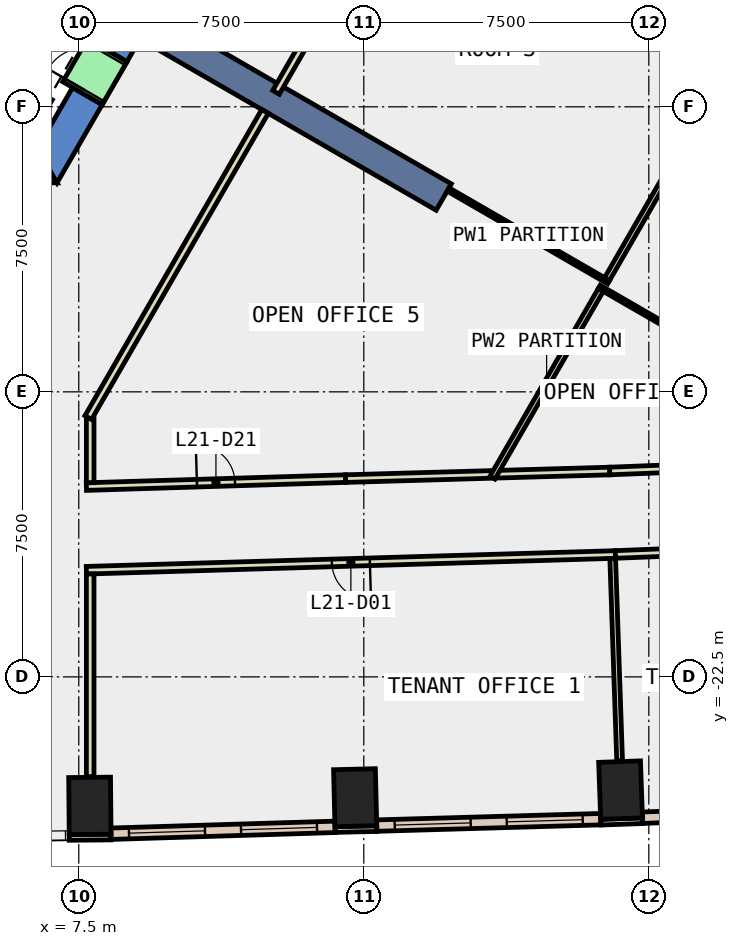
"""IFC4 building model, lengths in metres.
Left out: names, types, materials, properties, quantities, classifications, styles, units other than length and angle.
Written with IfcOpenShell. Run it as: python <this file> out.ifc"""

import sys

from ifc_helpers import new_model, si_unit, direction, frame, frame_2d, origin, origin_2d, place, context, subcontext, project, spatial, polyline, rectangle, outline, extrude, element, fill, save


model = new_model("IFC4")
c1 = context("Model", 3, precision=1e-05, world=origin(), true_north=direction((0.0, 1.0)))
c2 = subcontext(c1, "Body", "Model", "MODEL_VIEW")
j1 = project(units=[si_unit("LENGTHUNIT", "METRE"), si_unit("PLANEANGLEUNIT", "RADIAN")], contexts=[c1])
p1 = place(None, origin())
s1 = spatial("IfcSite", under=j1, at=p1, CompositionType="ELEMENT")
p2 = place(p1, origin())
s2 = spatial("IfcBuilding", under=s1, at=p2, CompositionType="ELEMENT")
p3 = place(p2, frame((0.0, 0.0, 99.2)))
s3 = spatial("IfcBuildingStorey", under=s2, at=p3, CompositionType="ELEMENT", Elevation=99.2)
for number, where, z_axis, x_axis in (
    (1, (7.792, -25.894, -0.4), (0.0, 0.0, 1.0), (1.0, 0.009, 0.0)),
    (2, (14.773, -25.679, -0.4), (0.0, 0.0, 1.0), (1.0, 0.024, 0.0)),
    (3, (21.757, -25.479, -0.4), (0.0, 0.0, 1.0), (0.999, 0.035, 0.0)),
):
    element("IfcColumn", number, at=place(p3, frame(where, z_axis=z_axis, x_axis=x_axis)), inside=s3, PredefinedType="COLUMN", context=c2, shape_type="SweptSolid", body=[
        extrude(rectangle(XDim=1.1, YDim=1.5, at=origin_2d()), origin(), (0.0, 0.0, 1.0), 4.2),
    ])
p4 = place(p3, frame((0.0, 0.0, -0.4)))
e4 = element("IfcWall", 4, at=p4, inside=s3, PredefinedType="SHEAR", context=c2, shape_type="SweptSolid", body=[
    extrude(outline(polyline([(5.75, -8.6), (5.75, -9.5), (6.928, -9.5), (6.409, -8.6), (5.75, -8.6)])), origin(), (0.0, 0.0, 1.0), 4.2),
])
p5 = place(p3, frame((0.0, 0.0, -0.4)))
e5 = element("IfcWall", 5, at=p5, inside=s3, PredefinedType="SHEAR", context=c2, shape_type="SweptSolid", body=[
    extrude(outline(polyline([(8.117, -7.44), (7.338, -6.99), (6.409, -8.6), (6.928, -9.5), (8.117, -7.44)])), origin(), (0.0, 0.0, 1.0), 4.2),
])
p6 = place(p3, frame((0.0, 0.0, -0.4)))
e6 = element("IfcWall", 6, at=p6, inside=s3, PredefinedType="SHEAR", context=c2, shape_type="SweptSolid", body=[
    extrude(outline(polyline([(9.417, -5.189), (8.638, -4.739), (7.988, -5.864), (8.767, -6.314), (9.417, -5.189)])), origin(), (0.0, 0.0, 1.0), 4.2),
])
p7 = place(p3, frame((0.0, 0.0, 3.6)))
e7 = element("IfcWall", 7, at=p7, inside=s3, PredefinedType="SHEAR", context=c2, shape_type="SweptSolid", body=[
    extrude(outline(polyline([(8.767, -6.314), (7.988, -5.864), (7.338, -6.99), (8.117, -7.44), (8.767, -6.314)])), origin(), (0.0, 0.0, 1.0), 0.2),
])
p8 = place(p3, frame((9.31, -5.375, -0.4), z_axis=(0.0, 0.0, 1.0), x_axis=(0.866017533419, -0.500013631625, 0.0)))
e8 = element("IfcWall", 8, at=p8, inside=s3, PredefinedType="SHEAR", context=c2, shape_type="SweptSolid", body=[
    extrude(rectangle(XDim=9.0, YDim=0.8, at=frame_2d((4.5, 0.0))), origin(), (0.0, 0.0, 1.0), 4.2),
])
p9 = place(p3, frame((7.249, -26.724, 0.0), z_axis=(0.0, 0.0, 1.0), x_axis=(0.99995860686, 0.009098602504, 0.0)))
e9 = element("IfcWall", 9, at=p9, inside=s3, PredefinedType="STANDARD", context=c2, shape_type="SweptSolid", body=[
    extrude(rectangle(XDim=1.1, YDim=0.15, at=frame_2d((0.55, 0.0))), origin(), (0.0, 0.0, 1.0), 3.8),
])
p10 = place(p3, frame((14.243, -26.517, 0.0), z_axis=(0.0, 0.0, 1.0), x_axis=(0.999718180159, 0.023739424163, 0.0)))
e10 = element("IfcWall", 10, at=p10, inside=s3, PredefinedType="STANDARD", context=c2, shape_type="SweptSolid", body=[
    extrude(rectangle(XDim=1.1, YDim=0.15, at=frame_2d((0.55, 0.0))), origin(), (0.0, 0.0, 1.0), 3.8),
])
p11 = place(p3, frame((21.237, -26.323, 0.0), z_axis=(0.0, 0.0, 1.0), x_axis=(0.999368780235, 0.035525217693, 0.0)))
e11 = element("IfcWall", 11, at=p11, inside=s3, PredefinedType="STANDARD", context=c2, shape_type="SweptSolid", body=[
    extrude(rectangle(XDim=1.1, YDim=0.15, at=frame_2d((0.55, 0.0))), origin(), (0.0, 0.0, 1.0), 3.8),
])
p12 = place(p3, frame((8.347, -26.627, 0.0), z_axis=(0.0, 0.0, 1.0), x_axis=(0.999529601824, 0.030668796478, 0.0)))
e12 = element("IfcWall", 12, at=p12, inside=s3, PredefinedType="STANDARD", context=c2, shape_type="SweptSolid", body=[
    extrude(rectangle(XDim=5.899, YDim=0.3, at=frame_2d((2.949, 0.0))), origin(), (0.0, 0.0, 1.0), 3.8),
])
p13 = place(p12, frame((0.475, 0.0, 0.9)))
e13 = element("IfcOpeningElement", 13, at=p13, cuts=e12, PredefinedType="OPENING", context=c2, shape_type="SweptSolid", body=[
    extrude(rectangle(XDim=2.0, YDim=2.6, at=frame_2d((1.0, 1.3))), frame((0.0, 0.16, 0.0), z_axis=(0.0, -1.0, 0.0), x_axis=(1.0, 0.0, 0.0)), (0.0, 0.0, 1.0), 0.32),
])
p14 = place(p12, frame((3.424, 0.0, 0.9)))
e14 = element("IfcOpeningElement", 14, at=p14, cuts=e12, PredefinedType="OPENING", context=c2, shape_type="SweptSolid", body=[
    extrude(rectangle(XDim=2.0, YDim=2.6, at=frame_2d((1.0, 1.3))), frame((0.0, 0.16, 0.0), z_axis=(0.0, -1.0, 0.0), x_axis=(1.0, 0.0, 0.0)), (0.0, 0.0, 1.0), 0.32),
])
p15 = place(p3, frame((15.34, -26.413, 0.0), z_axis=(0.0, 0.0, 1.0), x_axis=(0.999588397616, 0.028688592709, 0.0)))
e15 = element("IfcWall", 15, at=p15, inside=s3, PredefinedType="STANDARD", context=c2, shape_type="SweptSolid", body=[
    extrude(rectangle(XDim=5.897, YDim=0.3, at=frame_2d((2.949, 0.0))), origin(), (0.0, 0.0, 1.0), 3.8),
])
p16 = place(p15, frame((0.474, 0.0, 0.9)))
e16 = element("IfcOpeningElement", 16, at=p16, cuts=e15, PredefinedType="OPENING", context=c2, shape_type="SweptSolid", body=[
    extrude(rectangle(XDim=2.0, YDim=2.6, at=frame_2d((1.0, 1.3))), frame((0.0, 0.16, 0.0), z_axis=(0.0, -1.0, 0.0), x_axis=(1.0, 0.0, 0.0)), (0.0, 0.0, 1.0), 0.32),
])
p17 = place(p15, frame((3.423, 0.0, 0.9)))
e17 = element("IfcOpeningElement", 17, at=p17, cuts=e15, PredefinedType="OPENING", context=c2, shape_type="SweptSolid", body=[
    extrude(rectangle(XDim=2.0, YDim=2.6, at=frame_2d((1.0, 1.3))), frame((0.0, 0.16, 0.0), z_axis=(0.0, -1.0, 0.0), x_axis=(1.0, 0.0, 0.0)), (0.0, 0.0, 1.0), 0.32),
])
p18 = place(p3, frame((22.332, -26.206, 0.0), z_axis=(0.0, 0.0, 1.0), x_axis=(0.99922113396, 0.039460428885, 0.0)))
e18 = element("IfcWall", 18, at=p18, inside=s3, PredefinedType="STANDARD", context=c2, shape_type="SweptSolid", body=[
    extrude(rectangle(XDim=5.878, YDim=0.3, at=frame_2d((2.939, 0.0))), origin(), (0.0, 0.0, 1.0), 3.8),
])
p19 = place(p18, frame((0.469, 0.0, 0.9)))
e19 = element("IfcOpeningElement", 19, at=p19, cuts=e18, PredefinedType="OPENING", context=c2, shape_type="SweptSolid", body=[
    extrude(rectangle(XDim=2.0, YDim=2.6, at=frame_2d((1.0, 1.3))), frame((0.0, 0.16, 0.0), z_axis=(0.0, -1.0, 0.0), x_axis=(1.0, 0.0, 0.0)), (0.0, 0.0, 1.0), 0.32),
])
p20 = place(p18, frame((3.408, 0.0, 0.9)))
e20 = element("IfcOpeningElement", 20, at=p20, cuts=e18, PredefinedType="OPENING", context=c2, shape_type="SweptSolid", body=[
    extrude(rectangle(XDim=2.0, YDim=2.6, at=frame_2d((1.0, 1.3))), frame((0.0, 0.16, 0.0), z_axis=(0.0, -1.0, 0.0), x_axis=(1.0, 0.0, 0.0)), (0.0, 0.0, 1.0), 0.32),
])
p21 = place(p3, frame((7.7, -17.493, 0.0), z_axis=(0.0, 0.0, 1.0), x_axis=(0.999526319751, 0.030775576778, 0.0)))
e21 = element("IfcWall", 21, at=p21, inside=s3, PredefinedType="PARTITIONING", context=c2, shape_type="SweptSolid", body=[
    extrude(rectangle(XDim=6.822, YDim=0.2, at=frame_2d((3.411, 0.0))), origin(), (0.0, 0.0, 1.0), 3.8),
])
p22 = place(p21, frame((2.911, 0.0, 0.0)))
e22 = element("IfcOpeningElement", 22, at=p22, cuts=e21, PredefinedType="OPENING", context=c2, shape_type="SweptSolid", body=[
    extrude(rectangle(XDim=1.0, YDim=2.1, at=frame_2d((0.5, 1.05))), frame((0.0, 0.11, 0.0), z_axis=(0.0, -1.0, 0.0), x_axis=(1.0, 0.0, 0.0)), (0.0, 0.0, 1.0), 0.22),
])
p23 = place(p3, frame((14.519, -17.283, 0.0), z_axis=(0.0, 0.0, 1.0), x_axis=(0.999591204998, 0.028590608419, 0.0)))
e23 = element("IfcWall", 23, at=p23, inside=s3, PredefinedType="PARTITIONING", context=c2, shape_type="SweptSolid", body=[
    extrude(rectangle(XDim=3.843, YDim=0.2, at=frame_2d((1.921, 0.0))), origin(), (0.0, 0.0, 1.0), 3.8),
])
p24 = place(p3, frame((24.051, -7.315, 0.0), z_axis=(0.0, 0.0, 1.0), x_axis=(-0.475308630647, 0.87981913234, 0.0)))
e24 = element("IfcWall", 24, at=p24, inside=s3, PredefinedType="PARTITIONING", context=c2, shape_type="SweptSolid", body=[
    extrude(rectangle(XDim=4.166, YDim=0.2, at=frame_2d((2.083, 0.0))), origin(), (0.0, 0.0, 1.0), 3.8),
])
p25 = place(p3, frame((18.509, -17.168, 0.0), z_axis=(0.0, 0.0, 1.0), x_axis=(0.999588854267, 0.028672677323, 0.0)))
e25 = element("IfcWall", 25, at=p25, inside=s3, PredefinedType="PARTITIONING", context=c2, shape_type="SweptSolid", body=[
    extrude(rectangle(XDim=2.963, YDim=0.2, at=frame_2d((1.481, 0.0))), origin(), (0.0, 0.0, 1.0), 3.8),
])
p26 = place(p3, frame((21.471, -17.083, 0.0), z_axis=(0.0, 0.0, 1.0), x_axis=(0.999221407079, 0.039453512338, 0.0)))
e26 = element("IfcWall", 26, at=p26, inside=s3, PredefinedType="PARTITIONING", context=c2, shape_type="SweptSolid", body=[
    extrude(rectangle(XDim=6.083, YDim=0.2, at=frame_2d((3.042, 0.0))), origin(), (0.0, 0.0, 1.0), 3.8),
])
p27 = place(p26, frame((2.541, 0.0, 0.0)))
e27 = element("IfcOpeningElement", 27, at=p27, cuts=e26, PredefinedType="OPENING", context=c2, shape_type="SweptSolid", body=[
    extrude(rectangle(XDim=1.0, YDim=2.1, at=frame_2d((0.5, 1.05))), frame((0.0, 0.11, 0.0), z_axis=(0.0, -1.0, 0.0), x_axis=(1.0, 0.0, 0.0)), (0.0, 0.0, 1.0), 0.22),
])
p28 = place(p3, frame((21.621, -19.28, 0.0), z_axis=(0.0, 0.0, 1.0), x_axis=(-0.999557957525, -0.029730280001, 0.0)))
e28 = element("IfcWall", 28, at=p28, inside=s3, PredefinedType="PARTITIONING", context=c2, shape_type="SweptSolid", body=[
    extrude(rectangle(XDim=13.927, YDim=0.2, at=frame_2d((6.964, 0.0))), origin(), (0.0, 0.0, 1.0), 3.8),
])
p29 = place(p28, frame((6.464, 0.0, 0.0)))
e29 = element("IfcOpeningElement", 29, at=p29, cuts=e28, PredefinedType="OPENING", context=c2, shape_type="SweptSolid", body=[
    extrude(rectangle(XDim=1.0, YDim=2.1, at=frame_2d((0.5, 1.05))), frame((0.0, 0.11, 0.0), z_axis=(0.0, -1.0, 0.0), x_axis=(1.0, 0.0, 0.0)), (0.0, 0.0, 1.0), 0.22),
])
p30 = place(p3, frame((27.865, -19.032, 0.0), z_axis=(0.0, 0.0, 1.0), x_axis=(-0.999218029978, -0.039538950003, 0.0)))
e30 = element("IfcWall", 30, at=p30, inside=s3, PredefinedType="PARTITIONING", context=c2, shape_type="SweptSolid", body=[
    extrude(rectangle(XDim=6.249, YDim=0.2, at=frame_2d((3.125, 0.0))), origin(), (0.0, 0.0, 1.0), 3.8),
])
p31 = place(p30, frame((2.699, 0.0, 0.0)))
e31 = element("IfcOpeningElement", 31, at=p31, cuts=e30, PredefinedType="OPENING", context=c2, shape_type="SweptSolid", body=[
    extrude(rectangle(XDim=1.0, YDim=2.1, at=frame_2d((0.5, 1.05))), frame((0.0, 0.11, 0.0), z_axis=(0.0, -1.0, 0.0), x_axis=(1.0, 0.0, 0.0)), (0.0, 0.0, 1.0), 0.22),
])
p32 = place(p3, frame((7.8, -15.69, 0.0), z_axis=(0.0, 0.0, 1.0), x_axis=(0.0, -1.0, 0.0)))
e32 = element("IfcWall", 32, at=p32, inside=s3, PredefinedType="PARTITIONING", context=c2, shape_type="SweptSolid", body=[
    extrude(rectangle(XDim=1.7, YDim=0.2, at=frame_2d((0.85, 0.0))), origin(), (0.0, 0.0, 1.0), 3.8),
])
p33 = place(p3, frame((7.8, -19.791, 0.0), z_axis=(0.0, 0.0, 1.0), x_axis=(0.0, -1.0, 0.0)))
e33 = element("IfcWall", 33, at=p33, inside=s3, PredefinedType="PARTITIONING", context=c2, shape_type="SweptSolid", body=[
    extrude(rectangle(XDim=5.333, YDim=0.2, at=frame_2d((2.667, 0.0))), origin(), (0.0, 0.0, 1.0), 3.8),
])
p34 = place(p3, frame((12.401, -7.621, 0.0), z_axis=(0.0, 0.0, 1.0), x_axis=(-0.499983724212, -0.866034800411, 0.0)))
e34 = element("IfcWall", 34, at=p34, inside=s3, PredefinedType="PARTITIONING", context=c2, shape_type="SweptSolid", body=[
    extrude(rectangle(XDim=9.302, YDim=0.2, at=frame_2d((4.651, 0.0))), origin(), (0.0, 0.0, 1.0), 3.8),
])
p35 = place(p3, frame((18.503, 2.949, 0.0), z_axis=(0.0, 0.0, 1.0), x_axis=(-0.49997390151, -0.86604047123, 0.0)))
e35 = element("IfcWall", 35, at=p35, inside=s3, PredefinedType="PARTITIONING", context=c2, shape_type="SweptSolid", body=[
    extrude(rectangle(XDim=11.626, YDim=0.2, at=frame_2d((5.813, 0.0))), origin(), (0.0, 0.0, 1.0), 3.8),
])
p36 = place(p3, frame((17.219, -9.676, 0.0), z_axis=(0.0, 0.0, 1.0), x_axis=(0.86598459596, -0.500070674565, 0.0)))
e36 = element("IfcWall", 36, at=p36, inside=s3, PredefinedType="PARTITIONING", context=c2, shape_type="SweptSolid", body=[
    extrude(rectangle(XDim=4.875, YDim=0.1, at=frame_2d((2.438, 0.0))), origin(), (0.0, 0.0, 1.0), 3.8),
])
p37 = place(p3, frame((21.236, -12.319, 0.0), z_axis=(0.0, 0.0, 1.0), x_axis=(-0.500016488359, -0.866015884017, 0.0)))
e37 = element("IfcWall", 37, at=p37, inside=s3, PredefinedType="PARTITIONING", context=c2, shape_type="SweptSolid", body=[
    extrude(rectangle(XDim=5.702, YDim=0.15, at=frame_2d((2.851, 0.0))), origin(), (0.0, 0.0, 1.0), 3.8),
])
p38 = place(p3, frame((24.137, -7.294, 0.0), z_axis=(0.0, 0.0, 1.0), x_axis=(-0.500001804394, -0.866024362014, 0.0)))
e38 = element("IfcWall", 38, at=p38, inside=s3, PredefinedType="PARTITIONING", context=c2, shape_type="SweptSolid", body=[
    extrude(rectangle(XDim=5.472, YDim=0.15, at=frame_2d((2.736, 0.0))), origin(), (0.0, 0.0, 1.0), 3.8),
])
p39 = place(p3, frame((21.196, -12.238, 0.0), z_axis=(0.0, 0.0, 1.0), x_axis=(0.866023145199, -0.500003911965, 0.0)))
e39 = element("IfcWall", 39, at=p39, inside=s3, PredefinedType="PARTITIONING", context=c2, shape_type="SweptSolid", body=[
    extrude(rectangle(XDim=8.71, YDim=0.1, at=frame_2d((4.355, 0.0))), origin(), (0.0, 0.0, 1.0), 3.8),
])
p40 = place(p3, frame((21.55, -19.382, 0.0), z_axis=(0.0, 0.0, 1.0), x_axis=(0.034124666577, -0.999417583961, 0.0)))
e40 = element("IfcWall", 40, at=p40, inside=s3, PredefinedType="PARTITIONING", context=c2, shape_type="SweptSolid", body=[
    extrude(rectangle(XDim=5.33, YDim=0.15, at=frame_2d((2.665, 0.0))), origin(), (0.0, 0.0, 1.0), 3.8),
])
p41 = place(p3, frame((4.451, -6.19, 0.0), z_axis=(0.0, 0.0, 1.0), x_axis=(0.50000090737, 0.866024879913, 0.0)))
e41 = element("IfcWall", 41, at=p41, inside=s3, PredefinedType="STANDARD", context=c2, shape_type="SweptSolid", body=[
    extrude(rectangle(XDim=10.6, YDim=0.2, at=frame_2d((5.3, 0.0))), origin(), (0.0, 0.0, 1.0), 3.8),
])
p42 = place(p3, frame((4.588, -6.153, 0.0), z_axis=(0.0, 0.0, 1.0), x_axis=(0.866022959057, -0.500004234368, 0.0)))
e42 = element("IfcWall", 42, at=p42, inside=s3, PredefinedType="STANDARD", context=c2, shape_type="SweptSolid", body=[
    extrude(rectangle(XDim=2.5, YDim=0.2, at=frame_2d((1.25, 0.0))), origin(), (0.0, 0.0, 1.0), 3.8),
])
p43 = place(p3, frame((7.598, -7.14, 0.0), z_axis=(0.0, 0.0, 1.0), x_axis=(0.500362116554, 0.865816234728, 0.0)))
e43 = element("IfcWall", 43, at=p43, inside=s3, PredefinedType="STANDARD", context=c2, shape_type="SweptSolid", body=[
    extrude(rectangle(XDim=1.299, YDim=1.2, at=frame_2d((0.65, 0.0))), origin(), (0.0, 0.0, 1.0), 2.4),
])
p44 = place(p43, frame((0.1, 0.0, 0.0)))
e44 = element("IfcOpeningElement", 44, at=p44, cuts=e43, PredefinedType="OPENING", context=c2, shape_type="SweptSolid", body=[
    extrude(rectangle(XDim=1.1, YDim=2.3, at=frame_2d((0.55, 1.15))), frame((0.0, 0.61, 0.0), z_axis=(0.0, -1.0, 0.0), x_axis=(1.0, 0.0, 0.0)), (0.0, 0.0, 1.0), 1.22),
])
p45 = place(p13, origin())
e45 = element("IfcWindow", 45, at=p45, inside=s3, PartitioningType="SINGLE_PANEL", PredefinedType="WINDOW", context=c2, shape_type="SweptSolid", body=[
    extrude(rectangle(XDim=2.0, YDim=2.6, at=frame_2d((1.0, 1.3))), frame((0.0, 0.03, 0.0), z_axis=(0.0, -1.0, 0.0), x_axis=(1.0, 0.0, 0.0)), (0.0, 0.0, 1.0), 0.06),
])
fill(e13, e45)
p46 = place(p14, origin())
e46 = element("IfcWindow", 46, at=p46, inside=s3, PartitioningType="SINGLE_PANEL", PredefinedType="WINDOW", context=c2, shape_type="SweptSolid", body=[
    extrude(rectangle(XDim=2.0, YDim=2.6, at=frame_2d((1.0, 1.3))), frame((0.0, 0.03, 0.0), z_axis=(0.0, -1.0, 0.0), x_axis=(1.0, 0.0, 0.0)), (0.0, 0.0, 1.0), 0.06),
])
fill(e14, e46)
p47 = place(p16, origin())
e47 = element("IfcWindow", 47, at=p47, inside=s3, PartitioningType="SINGLE_PANEL", PredefinedType="WINDOW", context=c2, shape_type="SweptSolid", body=[
    extrude(rectangle(XDim=2.0, YDim=2.6, at=frame_2d((1.0, 1.3))), frame((0.0, 0.03, 0.0), z_axis=(0.0, -1.0, 0.0), x_axis=(1.0, 0.0, 0.0)), (0.0, 0.0, 1.0), 0.06),
])
fill(e16, e47)
p48 = place(p17, origin())
e48 = element("IfcWindow", 48, at=p48, inside=s3, PartitioningType="SINGLE_PANEL", PredefinedType="WINDOW", context=c2, shape_type="SweptSolid", body=[
    extrude(rectangle(XDim=2.0, YDim=2.6, at=frame_2d((1.0, 1.3))), frame((0.0, 0.03, 0.0), z_axis=(0.0, -1.0, 0.0), x_axis=(1.0, 0.0, 0.0)), (0.0, 0.0, 1.0), 0.06),
])
fill(e17, e48)
p49 = place(p29, origin())
e49 = element("IfcDoor", 49, at=p49, inside=s3, OperationType="SINGLE_SWING_LEFT", PredefinedType="DOOR", context=c2, shape_type="SweptSolid", body=[
    extrude(rectangle(XDim=1.0, YDim=2.1, at=frame_2d((0.5, 1.05))), frame((0.0, 0.025, 0.0), z_axis=(0.0, -1.0, 0.0), x_axis=(1.0, 0.0, 0.0)), (0.0, 0.0, 1.0), 0.05),
])
fill(e29, e49)
p50 = place(p22, origin())
e50 = element("IfcDoor", 50, at=p50, inside=s3, OperationType="SINGLE_SWING_LEFT", PredefinedType="DOOR", context=c2, shape_type="SweptSolid", body=[
    extrude(rectangle(XDim=1.0, YDim=2.1, at=frame_2d((0.5, 1.05))), frame((0.0, 0.025, 0.0), z_axis=(0.0, -1.0, 0.0), x_axis=(1.0, 0.0, 0.0)), (0.0, 0.0, 1.0), 0.05),
])
fill(e22, e50)
p51 = place(p44, origin())
e51 = element("IfcDoor", 51, at=p51, inside=s3, OperationType="SLIDING_TO_LEFT", PredefinedType="DOOR", context=c2, shape_type="SweptSolid", body=[
    extrude(rectangle(XDim=1.1, YDim=2.3, at=frame_2d((0.55, 1.15))), frame((0.0, 0.025, 0.0), z_axis=(0.0, -1.0, 0.0), x_axis=(1.0, 0.0, 0.0)), (0.0, 0.0, 1.0), 0.05),
])
fill(e44, e51)
save(model, sys.argv[1])
